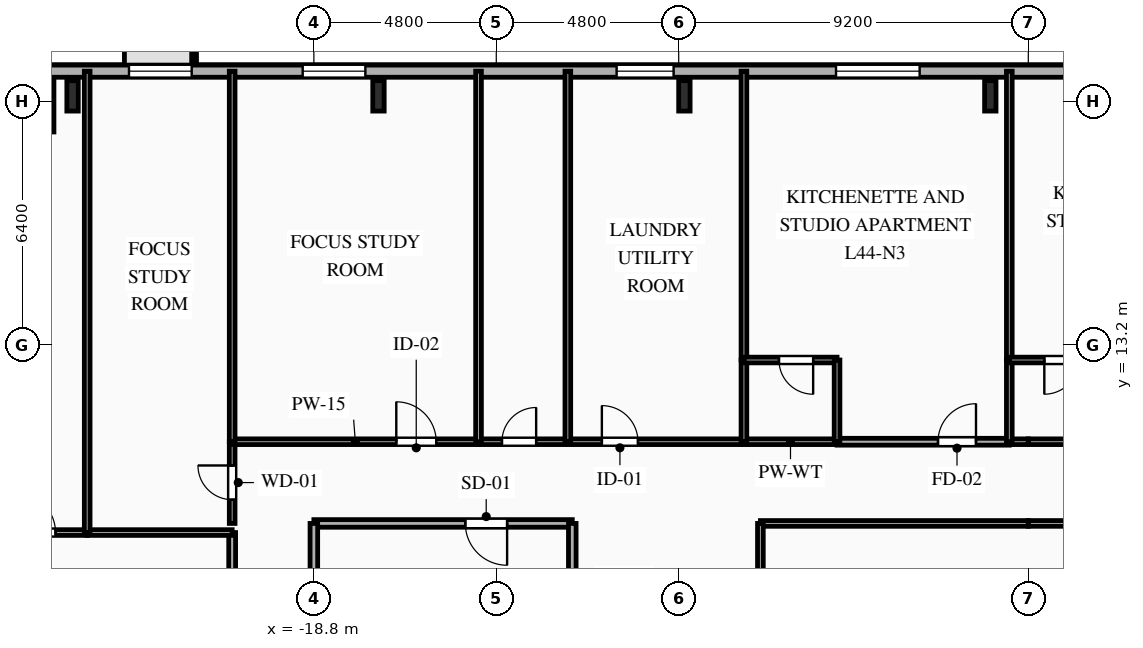
"""IFC4 building model, lengths in metres.
Left out: names, types, materials, properties, quantities, classifications, styles, units other than length and angle.
Written with IfcOpenShell. Run it as: python <this file> out.ifc"""

import sys

from ifc_helpers import new_model, si_unit, direction, frame, frame_2d, origin, origin_2d, place, context, subcontext, project, spatial, rectangle, i_section, extrude, element, fill, save


model = new_model("IFC4")
c1 = context("Model", 3, precision=1e-05, world=origin(), true_north=direction((0.0, 1.0)))
c2 = subcontext(c1, "Body", "Model", "MODEL_VIEW")
j1 = project(units=[si_unit("LENGTHUNIT", "METRE"), si_unit("PLANEANGLEUNIT", "RADIAN")], contexts=[c1])
p1 = place(None, origin())
s1 = spatial("IfcSite", under=j1, at=p1, CompositionType="ELEMENT")
p2 = place(p1, origin())
s2 = spatial("IfcBuilding", under=s1, at=p2, CompositionType="ELEMENT")
p3 = place(p2, frame((0.0, 0.0, 157.8)))
s3 = spatial("IfcBuildingStorey", under=s2, at=p3, CompositionType="ELEMENT", Elevation=157.8)
for number, where, z_axis, x_axis in (
    (1, (-1.0, 19.75, 0.0), (0.0, 0.0, 1.0), (1.0, 0.0, 0.0)),
    (2, (-9.05, 19.75, 0.0), (0.0, 0.0, 1.0), (1.0, 0.0, 0.0)),
    (3, (-17.1, 19.75, 0.0), (0.0, 0.0, 1.0), (1.0, 0.0, 0.0)),
    (4, (-25.15, 19.75, 0.0), (0.0, 0.0, 1.0), (1.0, 0.0, 0.0)),
):
    element("IfcColumn", number, at=place(p3, frame(where, z_axis=z_axis, x_axis=x_axis)), inside=s3, PredefinedType="COLUMN", context=c2, shape_type="SweptSolid", body=[
        extrude(i_section(OverallWidth=0.3, OverallDepth=0.8, WebThickness=0.018, FlangeThickness=0.033, FilletRadius=0.03, at=origin_2d()), origin(), (0.0, 0.0, 1.0), 3.35),
    ])
p4 = place(p3, frame((-25.8, 18.8, 0.0), z_axis=(0.0, 0.0, 1.0), x_axis=(0.0, 1.0, 0.0)))
e5 = element("IfcWall", 5, at=p4, inside=s3, PredefinedType="SOLIDWALL", context=c2, shape_type="SweptSolid", body=[
    extrude(rectangle(XDim=1.6, YDim=0.32, at=frame_2d((0.8, 0.0))), origin(), (0.0, 0.0, 1.0), 3.04),
])
p5 = place(p3, frame((-25.8, 20.4, 0.0), z_axis=(0.0, 0.0, 1.0), x_axis=(1.0, 0.0, 0.0)))
e6 = element("IfcWall", 6, at=p5, inside=s3, PredefinedType="SOLIDWALL", context=c2, shape_type="SweptSolid", body=[
    extrude(rectangle(XDim=49.6, YDim=0.32, at=frame_2d((24.8, 0.0))), origin(), (0.0, 0.0, 1.0), 3.04),
])
p6 = place(p5, frame((2.135, 0.0, 0.85)))
e7 = element("IfcOpeningElement", 7, at=p6, cuts=e6, PredefinedType="OPENING", context=c2, shape_type="SweptSolid", body=[
    extrude(rectangle(XDim=1.65, YDim=1.85, at=frame_2d((0.825, 0.925))), frame((0.0, 0.17, 0.0), z_axis=(0.0, -1.0, 0.0), x_axis=(1.0, 0.0, 0.0)), (0.0, 0.0, 1.0), 0.34),
])
p7 = place(p5, frame((6.706, 0.0, 0.85)))
e8 = element("IfcOpeningElement", 8, at=p7, cuts=e6, PredefinedType="OPENING", context=c2, shape_type="SweptSolid", body=[
    extrude(rectangle(XDim=1.65, YDim=1.85, at=frame_2d((0.825, 0.925))), frame((0.0, 0.17, 0.0), z_axis=(0.0, -1.0, 0.0), x_axis=(1.0, 0.0, 0.0)), (0.0, 0.0, 1.0), 0.34),
])
p8 = place(p5, frame((14.966, 0.0, 0.85)))
e9 = element("IfcOpeningElement", 9, at=p8, cuts=e6, PredefinedType="OPENING", context=c2, shape_type="SweptSolid", body=[
    extrude(rectangle(XDim=1.5, YDim=1.85, at=frame_2d((0.75, 0.925))), frame((0.0, 0.17, 0.0), z_axis=(0.0, -1.0, 0.0), x_axis=(1.0, 0.0, 0.0)), (0.0, 0.0, 1.0), 0.34),
])
p9 = place(p5, frame((20.74, 0.0, 0.85)))
e10 = element("IfcOpeningElement", 10, at=p9, cuts=e6, PredefinedType="OPENING", context=c2, shape_type="SweptSolid", body=[
    extrude(rectangle(XDim=2.2, YDim=1.85, at=frame_2d((1.1, 0.925))), frame((0.0, 0.17, 0.0), z_axis=(0.0, -1.0, 0.0), x_axis=(1.0, 0.0, 0.0)), (0.0, 0.0, 1.0), 0.34),
])
p10 = place(p5, frame((27.74, 0.0, 0.85)))
e11 = element("IfcOpeningElement", 11, at=p10, cuts=e6, PredefinedType="OPENING", context=c2, shape_type="SweptSolid", body=[
    extrude(rectangle(XDim=2.2, YDim=1.85, at=frame_2d((1.1, 0.925))), frame((0.0, 0.17, 0.0), z_axis=(0.0, -1.0, 0.0), x_axis=(1.0, 0.0, 0.0)), (0.0, 0.0, 1.0), 0.34),
])
p11 = place(p5, frame((34.7, 0.0, 0.85)))
e12 = element("IfcOpeningElement", 12, at=p11, cuts=e6, PredefinedType="OPENING", context=c2, shape_type="SweptSolid", body=[
    extrude(rectangle(XDim=2.2, YDim=1.85, at=frame_2d((1.1, 0.925))), frame((0.0, 0.17, 0.0), z_axis=(0.0, -1.0, 0.0), x_axis=(1.0, 0.0, 0.0)), (0.0, 0.0, 1.0), 0.34),
])
p12 = place(p5, frame((42.215, 0.0, 0.85)))
e13 = element("IfcOpeningElement", 13, at=p12, cuts=e6, PredefinedType="OPENING", context=c2, shape_type="SweptSolid", body=[
    extrude(rectangle(XDim=1.65, YDim=1.85, at=frame_2d((0.825, 0.925))), frame((0.0, 0.17, 0.0), z_axis=(0.0, -1.0, 0.0), x_axis=(1.0, 0.0, 0.0)), (0.0, 0.0, 1.0), 0.34),
])
p13 = place(p5, frame((47.45, 0.0, 0.85)))
e14 = element("IfcOpeningElement", 14, at=p13, cuts=e6, PredefinedType="OPENING", context=c2, shape_type="SweptSolid", body=[
    extrude(rectangle(XDim=1.1, YDim=1.85, at=frame_2d((0.55, 0.925))), frame((0.0, 0.17, 0.0), z_axis=(0.0, -1.0, 0.0), x_axis=(1.0, 0.0, 0.0)), (0.0, 0.0, 1.0), 0.34),
])
p14 = place(p3, frame((-12.0, 8.5, 0.0), z_axis=(0.0, 0.0, 1.0), x_axis=(-1.0, 0.0, 0.0)))
e15 = element("IfcWall", 15, at=p14, inside=s3, PredefinedType="PARTITIONING", context=c2, shape_type="SweptSolid", body=[
    extrude(rectangle(XDim=6.8, YDim=0.2, at=frame_2d((3.4, 0.0))), origin(), (0.0, 0.0, 1.0), 3.04),
])
p15 = place(p14, frame((1.715, 0.0, 0.0)))
e16 = element("IfcOpeningElement", 16, at=p15, cuts=e15, PredefinedType="OPENING", context=c2, shape_type="SweptSolid", body=[
    extrude(rectangle(XDim=1.1, YDim=2.15, at=frame_2d((0.55, 1.075))), frame((0.0, 0.11, 0.0), z_axis=(0.0, -1.0, 0.0), x_axis=(1.0, 0.0, 0.0)), (0.0, 0.0, 1.0), 0.22),
])
p16 = place(p3, frame((-18.8, 8.5, 0.0), z_axis=(0.0, 0.0, 1.0), x_axis=(0.0, -1.0, 0.0)))
e17 = element("IfcWall", 17, at=p16, inside=s3, PredefinedType="PARTITIONING", context=c2, shape_type="SweptSolid", body=[
    extrude(rectangle(XDim=2.9, YDim=0.2, at=frame_2d((1.45, 0.0))), origin(), (0.0, 0.0, 1.0), 2.525),
])
p17 = place(p3, frame((-12.0, 5.6, 0.0), z_axis=(0.0, 0.0, 1.0), x_axis=(0.0, 1.0, 0.0)))
e18 = element("IfcWall", 18, at=p17, inside=s3, PredefinedType="PARTITIONING", context=c2, shape_type="SweptSolid", body=[
    extrude(rectangle(XDim=2.9, YDim=0.2, at=frame_2d((1.45, 0.0))), origin(), (0.0, 0.0, 1.0), 3.04),
])
p18 = place(p3, frame((-20.95, 8.5, 0.0), z_axis=(0.0, 0.0, 1.0), x_axis=(0.0, 1.0, 0.0)))
e19 = element("IfcWall", 19, at=p18, inside=s3, PredefinedType="PARTITIONING", context=c2, shape_type="SweptSolid", body=[
    extrude(rectangle(XDim=2.15, YDim=0.15, at=frame_2d((1.075, 0.0))), origin(), (0.0, 0.0, 1.0), 3.04),
])
p19 = place(p18, frame((0.625, 0.0, 0.0)))
e20 = element("IfcOpeningElement", 20, at=p19, cuts=e19, PredefinedType="OPENING", context=c2, shape_type="SweptSolid", body=[
    extrude(rectangle(XDim=0.9, YDim=2.1, at=frame_2d((0.45, 1.05))), frame((0.0, 0.085, 0.0), z_axis=(0.0, -1.0, 0.0), x_axis=(1.0, 0.0, 0.0)), (0.0, 0.0, 1.0), 0.17),
])
p20 = place(p3, frame((-20.95, 10.65, 0.0), z_axis=(0.0, 0.0, 1.0), x_axis=(1.0, 0.0, 0.0)))
e21 = element("IfcWall", 21, at=p20, inside=s3, PredefinedType="PARTITIONING", context=c2, shape_type="SweptSolid", body=[
    extrude(rectangle(XDim=6.483, YDim=0.15, at=frame_2d((3.241, 0.0))), origin(), (0.0, 0.0, 1.0), 3.04),
])
p21 = place(p20, frame((4.319, 0.0, 0.0)))
e22 = element("IfcOpeningElement", 22, at=p21, cuts=e21, PredefinedType="OPENING", context=c2, shape_type="SweptSolid", body=[
    extrude(rectangle(XDim=1.05, YDim=2.15, at=frame_2d((0.525, 1.075))), frame((0.0, 0.085, 0.0), z_axis=(0.0, -1.0, 0.0), x_axis=(1.0, 0.0, 0.0)), (0.0, 0.0, 1.0), 0.17),
])
p22 = place(p3, frame((-14.467, 10.65, 0.0), z_axis=(0.0, 0.0, 1.0), x_axis=(1.0, 0.0, 0.0)))
e23 = element("IfcWall", 23, at=p22, inside=s3, PredefinedType="PLUMBINGWALL", context=c2, shape_type="SweptSolid", body=[
    extrude(rectangle(XDim=2.35, YDim=0.15, at=frame_2d((1.175, 0.0))), origin(), (0.0, 0.0, 1.0), 3.04),
])
p23 = place(p22, frame((0.616, 0.0, 0.0)))
e24 = element("IfcOpeningElement", 24, at=p23, cuts=e23, PredefinedType="OPENING", context=c2, shape_type="SweptSolid", body=[
    extrude(rectangle(XDim=0.9, YDim=2.1, at=frame_2d((0.45, 1.05))), frame((0.0, 0.085, 0.0), z_axis=(0.0, -1.0, 0.0), x_axis=(1.0, 0.0, 0.0)), (0.0, 0.0, 1.0), 0.17),
])
p24 = place(p3, frame((-12.117, 10.65, 0.0), z_axis=(0.0, 0.0, 1.0), x_axis=(1.0, 0.0, 0.0)))
e25 = element("IfcWall", 25, at=p24, inside=s3, PredefinedType="PARTITIONING", context=c2, shape_type="SweptSolid", body=[
    extrude(rectangle(XDim=4.634, YDim=0.15, at=frame_2d((2.317, 0.0))), origin(), (0.0, 0.0, 1.0), 3.04),
])
p25 = place(p24, frame((0.896, 0.0, 0.0)))
e26 = element("IfcOpeningElement", 26, at=p25, cuts=e25, PredefinedType="OPENING", context=c2, shape_type="SweptSolid", body=[
    extrude(rectangle(XDim=0.95, YDim=2.1, at=frame_2d((0.475, 1.05))), frame((0.0, 0.085, 0.0), z_axis=(0.0, -1.0, 0.0), x_axis=(1.0, 0.0, 0.0)), (0.0, 0.0, 1.0), 0.17),
])
p26 = place(p3, frame((-5.033, 10.65, 0.0), z_axis=(0.0, 0.0, 1.0), x_axis=(1.0, 0.0, 0.0)))
e27 = element("IfcWall", 27, at=p26, inside=s3, PredefinedType="PARTITIONING", context=c2, shape_type="SweptSolid", body=[
    extrude(rectangle(XDim=4.533, YDim=0.18, at=frame_2d((2.267, 0.0))), origin(), (0.0, 0.0, 1.0), 3.04),
])
p27 = place(p26, frame((2.656, 0.0, 0.0)))
e28 = element("IfcOpeningElement", 28, at=p27, cuts=e27, PredefinedType="OPENING", context=c2, shape_type="SweptSolid", body=[
    extrude(rectangle(XDim=1.0, YDim=2.15, at=frame_2d((0.5, 1.075))), frame((0.0, 0.1, 0.0), z_axis=(0.0, -1.0, 0.0), x_axis=(1.0, 0.0, 0.0)), (0.0, 0.0, 1.0), 0.2),
])
p28 = place(p3, frame((-7.483, 10.65, 0.0), z_axis=(0.0, 0.0, 1.0), x_axis=(1.0, 0.0, 0.0)))
e29 = element("IfcWall", 29, at=p28, inside=s3, PredefinedType="PLUMBINGWALL", context=c2, shape_type="SweptSolid", body=[
    extrude(rectangle(XDim=2.45, YDim=0.15, at=frame_2d((1.225, 0.0))), origin(), (0.0, 0.0, 1.0), 3.04),
])
p29 = place(p3, frame((-0.5, 10.65, 0.0), z_axis=(0.0, 0.0, 1.0), x_axis=(1.0, 0.0, 0.0)))
e30 = element("IfcWall", 30, at=p29, inside=s3, PredefinedType="PLUMBINGWALL", context=c2, shape_type="SweptSolid", body=[
    extrude(rectangle(XDim=0.5, YDim=0.15, at=frame_2d((0.25, 0.0))), origin(), (0.0, 0.0, 1.0), 3.04),
])
p30 = place(p3, frame((0.0, 8.5, 0.0), z_axis=(0.0, 0.0, 1.0), x_axis=(-1.0, 0.0, 0.0)))
e31 = element("IfcWall", 31, at=p30, inside=s3, PredefinedType="PARTITIONING", context=c2, shape_type="SweptSolid", body=[
    extrude(rectangle(XDim=7.05, YDim=0.15, at=frame_2d((3.525, 0.0))), origin(), (0.0, 0.0, 1.0), 3.04),
])
p31 = place(p3, frame((0.0, 10.65, 0.0), z_axis=(0.0, 0.0, 1.0), x_axis=(1.0, 0.0, 0.0)))
e32 = element("IfcWall", 32, at=p31, inside=s3, PredefinedType="PLUMBINGWALL", context=c2, shape_type="SweptSolid", body=[
    extrude(rectangle(XDim=1.95, YDim=0.15, at=frame_2d((0.975, 0.0))), origin(), (0.0, 0.0, 1.0), 3.04),
])
p32 = place(p3, frame((7.05, 8.5, 0.0), z_axis=(0.0, 0.0, 1.0), x_axis=(-1.0, 0.0, 0.0)))
e33 = element("IfcWall", 33, at=p32, inside=s3, PredefinedType="PARTITIONING", context=c2, shape_type="SweptSolid", body=[
    extrude(rectangle(XDim=7.05, YDim=0.15, at=frame_2d((3.525, 0.0))), origin(), (0.0, 0.0, 1.0), 3.04),
])
p33 = place(p3, frame((-20.95, -1.31, 0.0), z_axis=(0.0, 0.0, 1.0), x_axis=(0.0, 1.0, 0.0)))
e34 = element("IfcWall", 34, at=p33, inside=s3, PredefinedType="PARTITIONING", context=c2, shape_type="SweptSolid", body=[
    extrude(rectangle(XDim=9.57, YDim=0.18, at=frame_2d((4.785, 0.0))), origin(), (0.0, 0.0, 1.0), 3.04),
])
p34 = place(p33, frame((1.506, 0.0, 0.0)))
e35 = element("IfcOpeningElement", 35, at=p34, cuts=e34, PredefinedType="OPENING", context=c2, shape_type="SweptSolid", body=[
    extrude(rectangle(XDim=1.0, YDim=2.15, at=frame_2d((0.5, 1.075))), frame((0.0, 0.1, 0.0), z_axis=(0.0, -1.0, 0.0), x_axis=(1.0, 0.0, 0.0)), (0.0, 0.0, 1.0), 0.2),
])
p35 = place(p3, frame((-7.05, 8.5, 0.0), z_axis=(0.0, 0.0, 1.0), x_axis=(0.0, -1.0, 0.0)))
e36 = element("IfcWall", 36, at=p35, inside=s3, PredefinedType="PARTITIONING", context=c2, shape_type="SweptSolid", body=[
    extrude(rectangle(XDim=9.3, YDim=0.15, at=frame_2d((4.65, 0.0))), origin(), (0.0, 0.0, 1.0), 3.04),
])
p36 = place(p3, frame((-29.0, 8.26, 0.0), z_axis=(0.0, 0.0, 1.0), x_axis=(1.0, 0.0, 0.0)))
e37 = element("IfcWall", 37, at=p36, inside=s3, PredefinedType="PARTITIONING", context=c2, shape_type="SweptSolid", body=[
    extrude(rectangle(XDim=4.235, YDim=0.15, at=frame_2d((2.118, 0.0))), origin(), (0.0, 0.0, 1.0), 3.04),
])
p37 = place(p36, frame((2.352, 0.0, 0.0)))
e38 = element("IfcOpeningElement", 38, at=p37, cuts=e37, PredefinedType="OPENING", context=c2, shape_type="SweptSolid", body=[
    extrude(rectangle(XDim=1.05, YDim=2.15, at=frame_2d((0.525, 1.075))), frame((0.0, 0.085, 0.0), z_axis=(0.0, -1.0, 0.0), x_axis=(1.0, 0.0, 0.0)), (0.0, 0.0, 1.0), 0.17),
])
p38 = place(p3, frame((-24.765, 8.26, 0.0), z_axis=(0.0, 0.0, 1.0), x_axis=(1.0, 0.0, 0.0)))
e39 = element("IfcWall", 39, at=p38, inside=s3, PredefinedType="PARTITIONING", context=c2, shape_type="SweptSolid", body=[
    extrude(rectangle(XDim=3.815, YDim=0.15, at=frame_2d((1.907, 0.0))), origin(), (0.0, 0.0, 1.0), 3.04),
])
p39 = place(p3, frame((-24.765, 20.4, 0.0), z_axis=(0.0, 0.0, 1.0), x_axis=(0.0, -1.0, 0.0)))
e40 = element("IfcWall", 40, at=p39, inside=s3, PredefinedType="PARTITIONING", context=c2, shape_type="SweptSolid", body=[
    extrude(rectangle(XDim=12.14, YDim=0.15, at=frame_2d((6.07, 0.0))), origin(), (0.0, 0.0, 1.0), 3.04),
])
p40 = place(p3, frame((-20.95, 20.4, 0.0), z_axis=(0.0, 0.0, 1.0), x_axis=(0.0, -1.0, 0.0)))
e41 = element("IfcWall", 41, at=p40, inside=s3, PredefinedType="PARTITIONING", context=c2, shape_type="SweptSolid", body=[
    extrude(rectangle(XDim=9.75, YDim=0.15, at=frame_2d((4.875, 0.0))), origin(), (0.0, 0.0, 1.0), 3.04),
])
for number, where, z_axis, x_axis in (
    (42, (-14.467, 20.4, 0.0), (0.0, 0.0, 1.0), (0.0, -1.0, 0.0)),
    (43, (-12.117, 20.4, 0.0), (0.0, 0.0, 1.0), (0.0, -1.0, 0.0)),
):
    element("IfcWall", number, at=place(p3, frame(where, z_axis=z_axis, x_axis=x_axis)), inside=s3, PredefinedType="PLUMBINGWALL", context=c2, shape_type="SweptSolid", body=[
        extrude(rectangle(XDim=9.75, YDim=0.15, at=frame_2d((4.875, 0.0))), origin(), (0.0, 0.0, 1.0), 3.04),
    ])
p41 = place(p3, frame((-7.483, 20.4, 0.0), z_axis=(0.0, 0.0, 1.0), x_axis=(0.0, -1.0, 0.0)))
e44 = element("IfcWall", 44, at=p41, inside=s3, PredefinedType="PARTITIONING", context=c2, shape_type="SweptSolid", body=[
    extrude(rectangle(XDim=7.6, YDim=0.15, at=frame_2d((3.8, 0.0))), origin(), (0.0, 0.0, 1.0), 3.04),
])
p42 = place(p3, frame((-7.483, 12.8, 0.0), z_axis=(0.0, 0.0, 1.0), x_axis=(0.0, -1.0, 0.0)))
e45 = element("IfcWall", 45, at=p42, inside=s3, PredefinedType="PLUMBINGWALL", context=c2, shape_type="SweptSolid", body=[
    extrude(rectangle(XDim=2.15, YDim=0.15, at=frame_2d((1.075, 0.0))), origin(), (0.0, 0.0, 1.0), 3.04),
])
p43 = place(p3, frame((-5.033, 12.8, 0.0), z_axis=(0.0, 0.0, 1.0), x_axis=(-1.0, 0.0, 0.0)))
e46 = element("IfcWall", 46, at=p43, inside=s3, PredefinedType="PLUMBINGWALL", context=c2, shape_type="SweptSolid", body=[
    extrude(rectangle(XDim=2.45, YDim=0.15, at=frame_2d((1.225, 0.0))), origin(), (0.0, 0.0, 1.0), 3.04),
])
p44 = place(p43, frame((0.629, 0.0, 0.0)))
e47 = element("IfcOpeningElement", 47, at=p44, cuts=e46, PredefinedType="OPENING", context=c2, shape_type="SweptSolid", body=[
    extrude(rectangle(XDim=0.9, YDim=2.1, at=frame_2d((0.45, 1.05))), frame((0.0, 0.085, 0.0), z_axis=(0.0, -1.0, 0.0), x_axis=(1.0, 0.0, 0.0)), (0.0, 0.0, 1.0), 0.17),
])
p45 = place(p3, frame((-5.033, 10.65, 0.0), z_axis=(0.0, 0.0, 1.0), x_axis=(0.0, 1.0, 0.0)))
e48 = element("IfcWall", 48, at=p45, inside=s3, PredefinedType="PLUMBINGWALL", context=c2, shape_type="SweptSolid", body=[
    extrude(rectangle(XDim=2.15, YDim=0.15, at=frame_2d((1.075, 0.0))), origin(), (0.0, 0.0, 1.0), 3.04),
])
p46 = place(p3, frame((-0.5, 20.4, 0.0), z_axis=(0.0, 0.0, 1.0), x_axis=(0.0, -1.0, 0.0)))
e49 = element("IfcWall", 49, at=p46, inside=s3, PredefinedType="PARTITIONING", context=c2, shape_type="SweptSolid", body=[
    extrude(rectangle(XDim=7.6, YDim=0.15, at=frame_2d((3.8, 0.0))), origin(), (0.0, 0.0, 1.0), 3.04),
])
p47 = place(p3, frame((-0.5, 12.8, 0.0), z_axis=(0.0, 0.0, 1.0), x_axis=(0.0, -1.0, 0.0)))
e50 = element("IfcWall", 50, at=p47, inside=s3, PredefinedType="PLUMBINGWALL", context=c2, shape_type="SweptSolid", body=[
    extrude(rectangle(XDim=2.15, YDim=0.15, at=frame_2d((1.075, 0.0))), origin(), (0.0, 0.0, 1.0), 3.04),
])
p48 = place(p3, frame((1.95, 12.8, 0.0), z_axis=(0.0, 0.0, 1.0), x_axis=(-1.0, 0.0, 0.0)))
e51 = element("IfcWall", 51, at=p48, inside=s3, PredefinedType="PLUMBINGWALL", context=c2, shape_type="SweptSolid", body=[
    extrude(rectangle(XDim=2.45, YDim=0.15, at=frame_2d((1.225, 0.0))), origin(), (0.0, 0.0, 1.0), 3.04),
])
p49 = place(p48, frame((0.629, 0.0, 0.0)))
e52 = element("IfcOpeningElement", 52, at=p49, cuts=e51, PredefinedType="OPENING", context=c2, shape_type="SweptSolid", body=[
    extrude(rectangle(XDim=0.9, YDim=2.1, at=frame_2d((0.45, 1.05))), frame((0.0, 0.085, 0.0), z_axis=(0.0, -1.0, 0.0), x_axis=(1.0, 0.0, 0.0)), (0.0, 0.0, 1.0), 0.17),
])
p50 = place(p6, origin())
e53 = element("IfcWindow", 53, at=p50, inside=s3, PartitioningType="SINGLE_PANEL", PredefinedType="WINDOW", context=c2, shape_type="SweptSolid", body=[
    extrude(rectangle(XDim=1.65, YDim=1.85, at=frame_2d((0.825, 0.925))), frame((0.0, 0.03, 0.0), z_axis=(0.0, -1.0, 0.0), x_axis=(1.0, 0.0, 0.0)), (0.0, 0.0, 1.0), 0.06),
])
fill(e7, e53)
p51 = place(p7, origin())
e54 = element("IfcWindow", 54, at=p51, inside=s3, PartitioningType="SINGLE_PANEL", PredefinedType="WINDOW", context=c2, shape_type="SweptSolid", body=[
    extrude(rectangle(XDim=1.65, YDim=1.85, at=frame_2d((0.825, 0.925))), frame((0.0, 0.03, 0.0), z_axis=(0.0, -1.0, 0.0), x_axis=(1.0, 0.0, 0.0)), (0.0, 0.0, 1.0), 0.06),
])
fill(e8, e54)
p52 = place(p8, origin())
e55 = element("IfcWindow", 55, at=p52, inside=s3, PartitioningType="SINGLE_PANEL", PredefinedType="WINDOW", context=c2, shape_type="SweptSolid", body=[
    extrude(rectangle(XDim=1.5, YDim=1.85, at=frame_2d((0.75, 0.925))), frame((0.0, 0.03, 0.0), z_axis=(0.0, -1.0, 0.0), x_axis=(1.0, 0.0, 0.0)), (0.0, 0.0, 1.0), 0.06),
])
fill(e9, e55)
p53 = place(p9, origin())
e56 = element("IfcWindow", 56, at=p53, inside=s3, PartitioningType="SINGLE_PANEL", PredefinedType="WINDOW", context=c2, shape_type="SweptSolid", body=[
    extrude(rectangle(XDim=2.2, YDim=1.85, at=frame_2d((1.1, 0.925))), frame((0.0, 0.03, 0.0), z_axis=(0.0, -1.0, 0.0), x_axis=(1.0, 0.0, 0.0)), (0.0, 0.0, 1.0), 0.06),
])
fill(e10, e56)
p54 = place(p15, origin())
e57 = element("IfcDoor", 57, at=p54, inside=s3, OperationType="SINGLE_SWING_LEFT", PredefinedType="DOOR", context=c2, shape_type="SweptSolid", body=[
    extrude(rectangle(XDim=1.1, YDim=2.15, at=frame_2d((0.55, 1.075))), frame((0.0, 0.025, 0.0), z_axis=(0.0, -1.0, 0.0), x_axis=(1.0, 0.0, 0.0)), (0.0, 0.0, 1.0), 0.05),
])
fill(e16, e57)
p55 = place(p19, origin())
e58 = element("IfcDoor", 58, at=p55, inside=s3, OperationType="SINGLE_SWING_RIGHT", PredefinedType="DOOR", context=c2, shape_type="SweptSolid", body=[
    extrude(rectangle(XDim=0.9, YDim=2.1, at=frame_2d((0.45, 1.05))), frame((0.0, 0.025, 0.0), z_axis=(0.0, -1.0, 0.0), x_axis=(1.0, 0.0, 0.0)), (0.0, 0.0, 1.0), 0.05),
])
fill(e20, e58)
p56 = place(p21, origin())
e59 = element("IfcDoor", 59, at=p56, inside=s3, OperationType="SINGLE_SWING_LEFT", PredefinedType="DOOR", context=c2, shape_type="SweptSolid", body=[
    extrude(rectangle(XDim=1.05, YDim=2.15, at=frame_2d((0.525, 1.075))), frame((0.0, 0.025, 0.0), z_axis=(0.0, -1.0, 0.0), x_axis=(1.0, 0.0, 0.0)), (0.0, 0.0, 1.0), 0.05),
])
fill(e22, e59)
p57 = place(p23, origin())
e60 = element("IfcDoor", 60, at=p57, inside=s3, OperationType="SINGLE_SWING_RIGHT", PredefinedType="DOOR", context=c2, shape_type="SweptSolid", body=[
    extrude(rectangle(XDim=0.9, YDim=2.1, at=frame_2d((0.45, 1.05))), frame((0.0, 0.025, 0.0), z_axis=(0.0, -1.0, 0.0), x_axis=(1.0, 0.0, 0.0)), (0.0, 0.0, 1.0), 0.05),
])
fill(e24, e60)
p58 = place(p25, origin())
e61 = element("IfcDoor", 61, at=p58, inside=s3, OperationType="SINGLE_SWING_LEFT", PredefinedType="DOOR", context=c2, shape_type="SweptSolid", body=[
    extrude(rectangle(XDim=0.95, YDim=2.1, at=frame_2d((0.475, 1.05))), frame((0.0, 0.025, 0.0), z_axis=(0.0, -1.0, 0.0), x_axis=(1.0, 0.0, 0.0)), (0.0, 0.0, 1.0), 0.05),
])
fill(e26, e61)
p59 = place(p27, origin())
e62 = element("IfcDoor", 62, at=p59, inside=s3, OperationType="SINGLE_SWING_RIGHT", PredefinedType="DOOR", context=c2, shape_type="SweptSolid", body=[
    extrude(rectangle(XDim=1.0, YDim=2.15, at=frame_2d((0.5, 1.075))), frame((0.0, 0.025, 0.0), z_axis=(0.0, -1.0, 0.0), x_axis=(1.0, 0.0, 0.0)), (0.0, 0.0, 1.0), 0.05),
])
fill(e28, e62)
p60 = place(p37, origin())
e63 = element("IfcDoor", 63, at=p60, inside=s3, OperationType="SINGLE_SWING_LEFT", PredefinedType="DOOR", context=c2, shape_type="SweptSolid", body=[
    extrude(rectangle(XDim=1.05, YDim=2.15, at=frame_2d((0.525, 1.075))), frame((0.0, 0.025, 0.0), z_axis=(0.0, -1.0, 0.0), x_axis=(1.0, 0.0, 0.0)), (0.0, 0.0, 1.0), 0.05),
])
fill(e38, e63)
p61 = place(p44, origin())
e64 = element("IfcDoor", 64, at=p61, inside=s3, OperationType="SINGLE_SWING_LEFT", PredefinedType="DOOR", context=c2, shape_type="SweptSolid", body=[
    extrude(rectangle(XDim=0.9, YDim=2.1, at=frame_2d((0.45, 1.05))), frame((0.0, 0.025, 0.0), z_axis=(0.0, -1.0, 0.0), x_axis=(1.0, 0.0, 0.0)), (0.0, 0.0, 1.0), 0.05),
])
fill(e47, e64)
p62 = place(p49, origin())
e65 = element("IfcDoor", 65, at=p62, inside=s3, OperationType="SINGLE_SWING_RIGHT", PredefinedType="DOOR", context=c2, shape_type="SweptSolid", body=[
    extrude(rectangle(XDim=0.9, YDim=2.1, at=frame_2d((0.45, 1.05))), frame((0.0, 0.025, 0.0), z_axis=(0.0, -1.0, 0.0), x_axis=(1.0, 0.0, 0.0)), (0.0, 0.0, 1.0), 0.05),
])
fill(e52, e65)
save(model, sys.argv[1])
